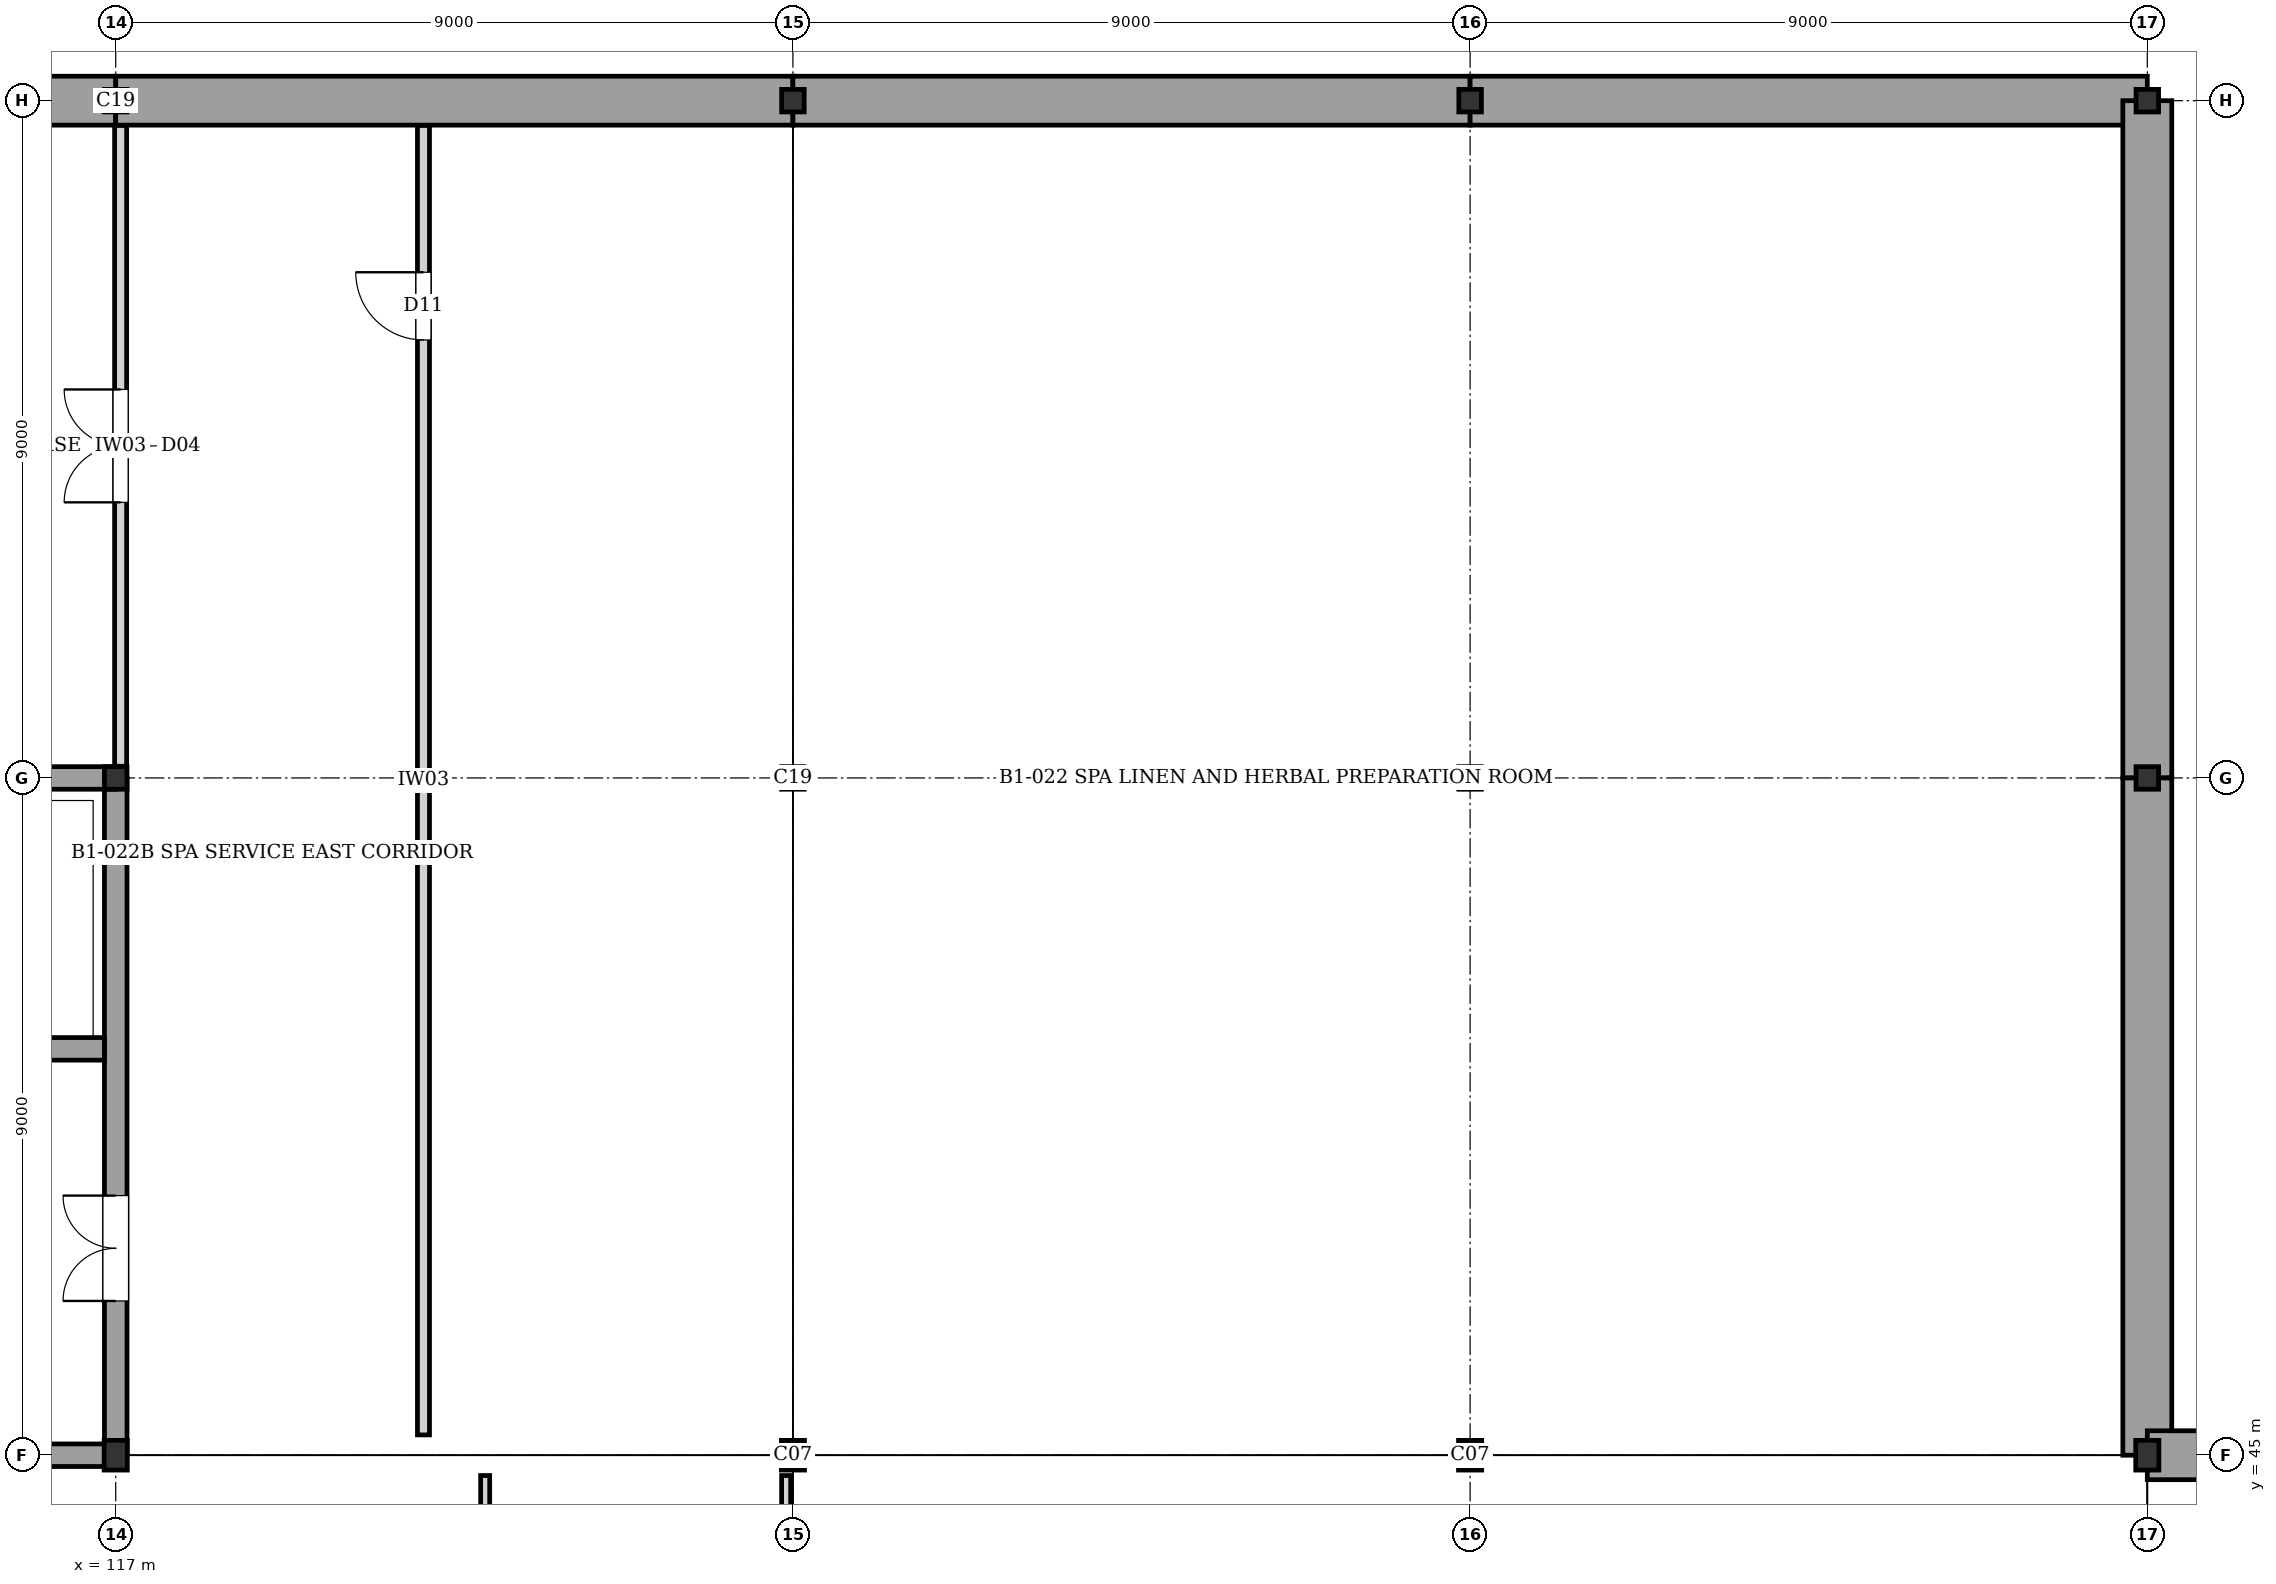
"""IFC4 building model, lengths in metres.
Left out: names, types, materials, properties, quantities, classifications, styles, units other than length and angle.
Written with IfcOpenShell. Run it as: python <this file> out.ifc"""

import sys

from ifc_helpers import new_model, si_unit, direction, frame, frame_2d, origin, origin_2d, place, context, subcontext, project, spatial, rectangle, hollow_rectangle, i_section, extrude, element, fill, save


model = new_model("IFC4")
c1 = context("Model", 3, precision=1e-05, world=origin(), true_north=direction((0.0, 1.0)))
c2 = subcontext(c1, "Body", "Model", "MODEL_VIEW")
j1 = project(units=[si_unit("LENGTHUNIT", "METRE"), si_unit("PLANEANGLEUNIT", "RADIAN")], contexts=[c1])
p1 = place(None, origin())
s1 = spatial("IfcSite", under=j1, at=p1, CompositionType="ELEMENT")
p2 = place(p1, origin())
s2 = spatial("IfcBuilding", under=s1, at=p2, CompositionType="ELEMENT")
p3 = place(p2, frame((0.0, 0.0, -4.48)))
s3 = spatial("IfcBuildingStorey", under=s2, at=p3, CompositionType="ELEMENT", Elevation=-4.48)
p4 = place(p3, frame((117.0, 45.0, 0.0), z_axis=(0.0, 0.0, 1.0), x_axis=(1.0, 0.0, 0.0)))
e1 = element("IfcColumn", 1, at=p4, inside=s3, PredefinedType="COLUMN", context=c2, shape_type="SweptSolid", body=[
    extrude(i_section(OverallWidth=0.308, OverallDepth=0.395, WebThickness=0.021, FlangeThickness=0.04, at=origin_2d()), origin(), (0.0, 0.0, 1.0), 4.48),
])
for number, where, z_axis, x_axis in (
    (2, (117.0, 54.0, 0.0), (0.0, 0.0, 1.0), (1.0, 0.0, 0.0)),
    (3, (117.0, 63.0, 0.0), (0.0, 0.0, 1.0), (1.0, 0.0, 0.0)),
):
    element("IfcColumn", number, at=place(p3, frame(where, z_axis=z_axis, x_axis=x_axis)), inside=s3, PredefinedType="COLUMN", context=c2, shape_type="SweptSolid", body=[
        extrude(hollow_rectangle(XDim=0.3, YDim=0.3, WallThickness=0.012, at=origin_2d()), origin(), (0.0, 0.0, 1.0), 4.48),
    ])
p5 = place(p3, frame((126.0, 45.0, 0.0), z_axis=(0.0, 0.0, 1.0), x_axis=(1.0, 0.0, 0.0)))
e4 = element("IfcColumn", 4, at=p5, inside=s3, PredefinedType="COLUMN", context=c2, shape_type="SweptSolid", body=[
    extrude(i_section(OverallWidth=0.308, OverallDepth=0.395, WebThickness=0.021, FlangeThickness=0.04, at=origin_2d()), origin(), (0.0, 0.0, 1.0), 4.48),
])
for number, where, z_axis, x_axis in (
    (5, (126.0, 54.0, 0.0), (0.0, 0.0, 1.0), (1.0, 0.0, 0.0)),
    (6, (126.0, 63.0, 0.0), (0.0, 0.0, 1.0), (1.0, 0.0, 0.0)),
):
    element("IfcColumn", number, at=place(p3, frame(where, z_axis=z_axis, x_axis=x_axis)), inside=s3, PredefinedType="COLUMN", context=c2, shape_type="SweptSolid", body=[
        extrude(hollow_rectangle(XDim=0.3, YDim=0.3, WallThickness=0.012, at=origin_2d()), origin(), (0.0, 0.0, 1.0), 4.48),
    ])
p6 = place(p3, frame((135.0, 45.0, 0.0), z_axis=(0.0, 0.0, 1.0), x_axis=(1.0, 0.0, 0.0)))
e7 = element("IfcColumn", 7, at=p6, inside=s3, PredefinedType="COLUMN", context=c2, shape_type="SweptSolid", body=[
    extrude(i_section(OverallWidth=0.308, OverallDepth=0.395, WebThickness=0.021, FlangeThickness=0.04, at=origin_2d()), origin(), (0.0, 0.0, 1.0), 4.48),
])
for number, where, z_axis, x_axis in (
    (8, (135.0, 54.0, 0.0), (0.0, 0.0, 1.0), (1.0, 0.0, 0.0)),
    (9, (135.0, 63.0, 0.0), (0.0, 0.0, 1.0), (1.0, 0.0, 0.0)),
):
    element("IfcColumn", number, at=place(p3, frame(where, z_axis=z_axis, x_axis=x_axis)), inside=s3, PredefinedType="COLUMN", context=c2, shape_type="SweptSolid", body=[
        extrude(hollow_rectangle(XDim=0.3, YDim=0.3, WallThickness=0.012, at=origin_2d()), origin(), (0.0, 0.0, 1.0), 4.48),
    ])
p7 = place(p3, frame((144.0, 45.0, 0.0), z_axis=(0.0, 0.0, 1.0), x_axis=(1.0, 0.0, 0.0)))
e10 = element("IfcColumn", 10, at=p7, inside=s3, PredefinedType="COLUMN", context=c2, shape_type="SweptSolid", body=[
    extrude(i_section(OverallWidth=0.308, OverallDepth=0.395, WebThickness=0.021, FlangeThickness=0.04, at=origin_2d()), origin(), (0.0, 0.0, 1.0), 4.48),
])
for number, where, z_axis, x_axis in (
    (11, (144.0, 54.0, 0.0), (0.0, 0.0, 1.0), (1.0, 0.0, 0.0)),
    (12, (144.0, 63.0, 0.0), (0.0, 0.0, 1.0), (1.0, 0.0, 0.0)),
):
    element("IfcColumn", number, at=place(p3, frame(where, z_axis=z_axis, x_axis=x_axis)), inside=s3, PredefinedType="COLUMN", context=c2, shape_type="SweptSolid", body=[
        extrude(hollow_rectangle(XDim=0.3, YDim=0.3, WallThickness=0.012, at=origin_2d()), origin(), (0.0, 0.0, 1.0), 4.48),
    ])
for number, where, z_axis, x_axis in (
    (13, (108.0, 63.0, 0.0), (0.0, 0.0, 1.0), (1.0, 0.0, 0.0)),
    (14, (117.0, 63.0, 0.0), (0.0, 0.0, 1.0), (1.0, 0.0, 0.0)),
    (15, (126.0, 63.0, 0.0), (0.0, 0.0, 1.0), (1.0, 0.0, 0.0)),
    (16, (135.0, 63.0, 0.0), (0.0, 0.0, 1.0), (1.0, 0.0, 0.0)),
    (17, (144.0, 63.0, 0.0), (0.0, 0.0, 1.0), (0.0, -1.0, 0.0)),
    (18, (144.0, 54.0, 0.0), (0.0, 0.0, 1.0), (0.0, -1.0, 0.0)),
):
    element("IfcWall", number, at=place(p3, frame(where, z_axis=z_axis, x_axis=x_axis)), inside=s3, PredefinedType="USERDEFINED", context=c2, shape_type="SweptSolid", body=[
        extrude(rectangle(XDim=9.0, YDim=0.65, at=frame_2d((4.5, 0.0))), origin(), (0.0, 0.0, 1.0), 4.03),
    ])
p8 = place(p3, frame((144.0, 45.0, 0.0), z_axis=(0.0, 0.0, 1.0), x_axis=(1.0, 0.0, 0.0)))
e19 = element("IfcWall", 19, at=p8, inside=s3, PredefinedType="USERDEFINED", context=c2, shape_type="SweptSolid", body=[
    extrude(rectangle(XDim=9.0, YDim=0.65, at=frame_2d((4.5, 0.0))), origin(), (0.0, 0.0, 1.0), 4.22),
])
p9 = place(p3, frame((108.0, 45.0, 0.0), z_axis=(0.0, 0.0, 1.0), x_axis=(1.0, 0.0, 0.0)))
e20 = element("IfcWall", 20, at=p9, inside=s3, PredefinedType="SHEAR", context=c2, shape_type="SweptSolid", body=[
    extrude(rectangle(XDim=9.0, YDim=0.3, at=frame_2d((4.5, 0.0))), origin(), (0.0, 0.0, 1.0), 4.03),
])
p10 = place(p3, frame((117.0, 45.0, 0.0), z_axis=(0.0, 0.0, 1.0), x_axis=(0.0, 1.0, 0.0)))
e21 = element("IfcWall", 21, at=p10, inside=s3, PredefinedType="SHEAR", context=c2, shape_type="SweptSolid", body=[
    extrude(rectangle(XDim=9.0, YDim=0.3, at=frame_2d((4.5, 0.0))), origin(), (0.0, 0.0, 1.0), 4.03),
])
p11 = place(p10, frame((2.05, 0.0, 0.0)))
e22 = element("IfcOpeningElement", 22, at=p11, cuts=e21, PredefinedType="OPENING", context=c2, shape_type="SweptSolid", body=[
    extrude(rectangle(XDim=1.4, YDim=2.02, at=frame_2d((0.7, 1.01))), frame((0.0, 0.16, 0.0), z_axis=(0.0, -1.0, 0.0), x_axis=(1.0, 0.0, 0.0)), (0.0, 0.0, 1.0), 0.32),
])
p12 = place(p3, frame((108.0, 54.0, 0.0), z_axis=(0.0, 0.0, 1.0), x_axis=(1.0, 0.0, 0.0)))
e23 = element("IfcWall", 23, at=p12, inside=s3, PredefinedType="SHEAR", context=c2, shape_type="SweptSolid", body=[
    extrude(rectangle(XDim=9.0, YDim=0.3, at=frame_2d((4.5, 0.0))), origin(), (0.0, 0.0, 1.0), 4.03),
])
p13 = place(p3, frame((112.65, 50.4, 0.0), z_axis=(0.0, 0.0, 1.0), x_axis=(1.0, 0.0, 0.0)))
e24 = element("IfcWall", 24, at=p13, inside=s3, PredefinedType="SHEAR", context=c2, shape_type="SweptSolid", body=[
    extrude(rectangle(XDim=4.2, YDim=0.3, at=frame_2d((2.1, 0.0))), origin(), (0.0, 0.0, 1.0), 4.03),
])
p14 = place(p13, frame((1.5, 0.0, 0.0)))
e25 = element("IfcOpeningElement", 25, at=p14, cuts=e24, PredefinedType="OPENING", context=c2, shape_type="SweptSolid", body=[
    extrude(rectangle(XDim=1.2, YDim=2.2, at=frame_2d((0.6, 1.1))), frame((0.0, 0.16, 0.0), z_axis=(0.0, -1.0, 0.0), x_axis=(1.0, 0.0, 0.0)), (0.0, 0.0, 1.0), 0.32),
])
p15 = place(p3, frame((117.065, 54.155, 0.0), z_axis=(0.0, 0.0, 1.0), x_axis=(0.0, 1.0, 0.0)))
e26 = element("IfcWall", 26, at=p15, inside=s3, PredefinedType="PARTITIONING", context=c2, shape_type="SweptSolid", body=[
    extrude(rectangle(XDim=8.515, YDim=0.16, at=frame_2d((4.257, 0.0))), origin(), (0.0, 0.0, 1.0), 3.13),
])
p16 = place(p15, frame((3.508, 0.0, 0.0)))
e27 = element("IfcOpeningElement", 27, at=p16, cuts=e26, PredefinedType="OPENING", context=c2, shape_type="SweptSolid", body=[
    extrude(rectangle(XDim=1.5, YDim=2.1, at=frame_2d((0.75, 1.05))), frame((0.0, 0.09, 0.0), z_axis=(0.0, -1.0, 0.0), x_axis=(1.0, 0.0, 0.0)), (0.0, 0.0, 1.0), 0.18),
])
p17 = place(p3, frame((121.09, 45.27, 0.0), z_axis=(0.0, 0.0, 1.0), x_axis=(0.0, 1.0, 0.0)))
e28 = element("IfcWall", 28, at=p17, inside=s3, PredefinedType="PARTITIONING", context=c2, shape_type="SweptSolid", body=[
    extrude(rectangle(XDim=17.4, YDim=0.16, at=frame_2d((8.7, 0.0))), origin(), (0.0, 0.0, 1.0), 4.03),
])
p18 = place(p17, frame((14.55, 0.0, 0.0)))
e29 = element("IfcOpeningElement", 29, at=p18, cuts=e28, PredefinedType="OPENING", context=c2, shape_type="SweptSolid", body=[
    extrude(rectangle(XDim=0.9, YDim=2.2, at=frame_2d((0.45, 1.1))), frame((0.0, 0.09, 0.0), z_axis=(0.0, -1.0, 0.0), x_axis=(1.0, 0.0, 0.0)), (0.0, 0.0, 1.0), 0.18),
])
p19 = place(p3, frame((121.91, 18.22, 0.0), z_axis=(0.0, 0.0, 1.0), x_axis=(0.0, 1.0, 0.0)))
e30 = element("IfcWall", 30, at=p19, inside=s3, PredefinedType="PARTITIONING", context=c2, shape_type="SweptSolid", body=[
    extrude(rectangle(XDim=26.51, YDim=0.12, at=frame_2d((13.255, 0.0))), origin(), (0.0, 0.0, 1.0), 4.22),
])
p20 = place(p19, frame((12.755, 0.0, 0.0)))
e31 = element("IfcOpeningElement", 31, at=p20, cuts=e30, PredefinedType="OPENING", context=c2, shape_type="SweptSolid", body=[
    extrude(rectangle(XDim=1.0, YDim=2.1, at=frame_2d((0.5, 1.05))), frame((0.0, 0.07, 0.0), z_axis=(0.0, -1.0, 0.0), x_axis=(1.0, 0.0, 0.0)), (0.0, 0.0, 1.0), 0.14),
])
p21 = place(p3, frame((125.91, 36.33, 0.0), z_axis=(0.0, 0.0, 1.0), x_axis=(0.0, 1.0, 0.0)))
e32 = element("IfcWall", 32, at=p21, inside=s3, PredefinedType="PARTITIONING", context=c2, shape_type="SweptSolid", body=[
    extrude(rectangle(XDim=8.4, YDim=0.12, at=frame_2d((4.2, 0.0))), origin(), (0.0, 0.0, 1.0), 3.32),
])
p22 = place(p21, frame((3.7, 0.0, 0.0)))
e33 = element("IfcOpeningElement", 33, at=p22, cuts=e32, PredefinedType="OPENING", context=c2, shape_type="SweptSolid", body=[
    extrude(rectangle(XDim=1.0, YDim=2.1, at=frame_2d((0.5, 1.05))), frame((0.0, 0.07, 0.0), z_axis=(0.0, -1.0, 0.0), x_axis=(1.0, 0.0, 0.0)), (0.0, 0.0, 1.0), 0.14),
])
p23 = place(p11, origin())
e34 = element("IfcDoor", 34, at=p23, inside=s3, OperationType="DOUBLE_DOOR_SINGLE_SWING", PredefinedType="DOOR", context=c2, shape_type="SweptSolid", body=[
    extrude(rectangle(XDim=1.4, YDim=2.02, at=frame_2d((0.7, 1.01))), frame((0.0, 0.025, 0.0), z_axis=(0.0, -1.0, 0.0), x_axis=(1.0, 0.0, 0.0)), (0.0, 0.0, 1.0), 0.05),
])
fill(e22, e34)
p24 = place(p16, origin())
e35 = element("IfcDoor", 35, at=p24, inside=s3, OperationType="DOUBLE_DOOR_SINGLE_SWING", PredefinedType="DOOR", context=c2, shape_type="SweptSolid", body=[
    extrude(rectangle(XDim=1.5, YDim=2.1, at=frame_2d((0.75, 1.05))), frame((0.0, 0.025, 0.0), z_axis=(0.0, -1.0, 0.0), x_axis=(1.0, 0.0, 0.0)), (0.0, 0.0, 1.0), 0.05),
])
fill(e27, e35)
p25 = place(p18, origin())
e36 = element("IfcDoor", 36, at=p25, inside=s3, OperationType="SINGLE_SWING_RIGHT", PredefinedType="DOOR", context=c2, shape_type="SweptSolid", body=[
    extrude(rectangle(XDim=0.9, YDim=2.2, at=frame_2d((0.45, 1.1))), frame((0.0, 0.025, 0.0), z_axis=(0.0, -1.0, 0.0), x_axis=(1.0, 0.0, 0.0)), (0.0, 0.0, 1.0), 0.05),
])
fill(e29, e36)
save(model, sys.argv[1])
